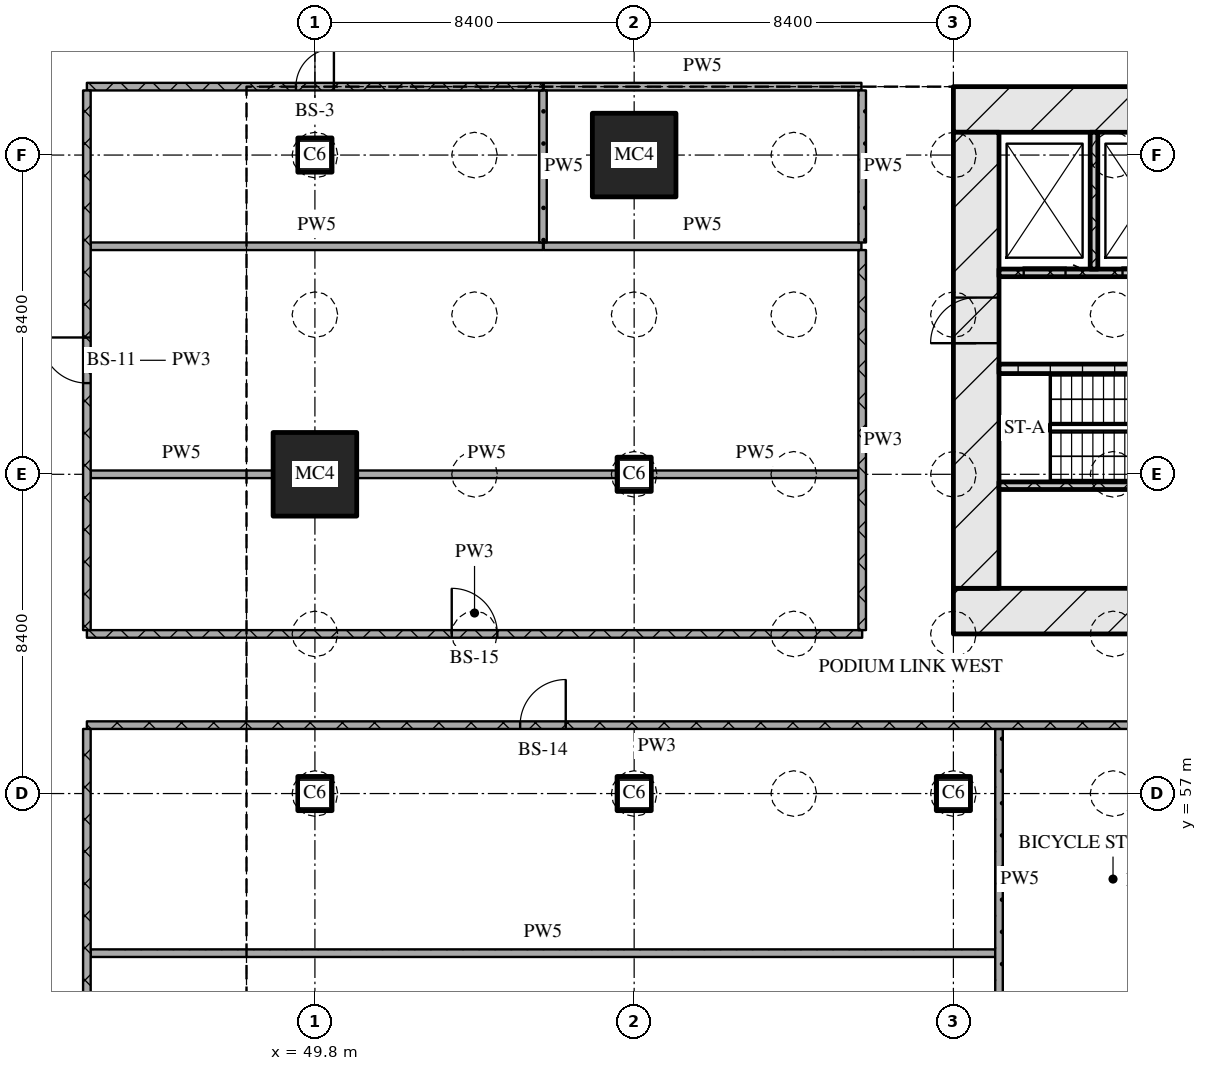
"""IFC4 building model, lengths in metres.
Left out: names, types, materials, properties, quantities, classifications, styles, units other than length and angle.
Written with IfcOpenShell. Run it as: python <this file> out.ifc"""

import sys

from ifc_helpers import new_model, si_unit, direction, frame, frame_2d, origin, origin_2d, place, context, subcontext, project, spatial, rectangle, extrude, element, fill, save


model = new_model("IFC4")
c1 = context("Model", 3, precision=1e-05, world=origin(), true_north=direction((0.0, 1.0)))
c2 = subcontext(c1, "Body", "Model", "MODEL_VIEW")
j1 = project(units=[si_unit("LENGTHUNIT", "METRE"), si_unit("PLANEANGLEUNIT", "RADIAN")], contexts=[c1])
p1 = place(None, origin())
s1 = spatial("IfcSite", under=j1, at=p1, CompositionType="ELEMENT")
p2 = place(p1, origin())
s2 = spatial("IfcBuilding", under=s1, at=p2, CompositionType="ELEMENT")
p3 = place(p2, frame((0.0, 0.0, -6.0)))
s3 = spatial("IfcBuildingStorey", under=s2, at=p3, CompositionType="ELEMENT", Elevation=-6.0)
p4 = place(p3, frame((49.8, 57.0, 0.0), z_axis=(0.0, 0.0, 1.0), x_axis=(1.0, 0.0, 0.0)))
e1 = element("IfcColumn", 1, at=p4, inside=s3, PredefinedType="COLUMN", context=c2, shape_type="SweptSolid", body=[
    extrude(rectangle(XDim=0.9, YDim=0.9, at=origin_2d()), origin(), (0.0, 0.0, 1.0), 6.0),
])
p5 = place(p3, frame((49.8, 65.4, 0.0), z_axis=(0.0, 0.0, 1.0), x_axis=(1.0, 0.0, 0.0)))
e2 = element("IfcColumn", 2, at=p5, inside=s3, PredefinedType="COLUMN", context=c2, shape_type="SweptSolid", body=[
    extrude(rectangle(XDim=2.2, YDim=2.2, at=origin_2d()), origin(), (0.0, 0.0, 1.0), 6.0),
])
for number, where, z_axis, x_axis in (
    (3, (49.8, 73.8, 0.0), (0.0, 0.0, 1.0), (1.0, 0.0, 0.0)),
    (4, (58.2, 57.0, 0.0), (0.0, 0.0, 1.0), (1.0, 0.0, 0.0)),
    (5, (58.2, 65.4, 0.0), (0.0, 0.0, 1.0), (1.0, 0.0, 0.0)),
):
    element("IfcColumn", number, at=place(p3, frame(where, z_axis=z_axis, x_axis=x_axis)), inside=s3, PredefinedType="COLUMN", context=c2, shape_type="SweptSolid", body=[
        extrude(rectangle(XDim=0.9, YDim=0.9, at=origin_2d()), origin(), (0.0, 0.0, 1.0), 6.0),
    ])
p6 = place(p3, frame((58.2, 73.8, 0.0), z_axis=(0.0, 0.0, 1.0), x_axis=(1.0, 0.0, 0.0)))
e6 = element("IfcColumn", 6, at=p6, inside=s3, PredefinedType="COLUMN", context=c2, shape_type="SweptSolid", body=[
    extrude(rectangle(XDim=2.2, YDim=2.2, at=origin_2d()), origin(), (0.0, 0.0, 1.0), 6.0),
])
p7 = place(p3, frame((66.6, 57.0, 0.0), z_axis=(0.0, 0.0, 1.0), x_axis=(1.0, 0.0, 0.0)))
e7 = element("IfcColumn", 7, at=p7, inside=s3, PredefinedType="COLUMN", context=c2, shape_type="SweptSolid", body=[
    extrude(rectangle(XDim=0.9, YDim=0.9, at=origin_2d()), origin(), (0.0, 0.0, 1.0), 6.0),
])
p8 = place(p3, frame((66.6, 61.8, 0.0), z_axis=(0.0, 0.0, 1.0), x_axis=(1.0, 0.0, 0.0)))
e8 = element("IfcWall", 8, at=p8, inside=s3, PredefinedType="SOLIDWALL", context=c2, shape_type="SweptSolid", body=[
    extrude(rectangle(XDim=42.0, YDim=1.2, at=frame_2d((21.0, 0.0))), origin(), (0.0, 0.0, 1.0), 5.7),
])
p9 = place(p8, frame((21.35, 0.0, 0.0)))
e9 = element("IfcOpeningElement", 9, at=p9, cuts=e8, PredefinedType="OPENING", context=c2, shape_type="SweptSolid", body=[
    extrude(rectangle(XDim=1.8, YDim=2.1, at=frame_2d((0.9, 1.05))), frame((0.0, 0.61, 0.0), z_axis=(0.0, -1.0, 0.0), x_axis=(1.0, 0.0, 0.0)), (0.0, 0.0, 1.0), 1.22),
])
p10 = place(p3, frame((66.6, 75.0, 0.0), z_axis=(0.0, 0.0, 1.0), x_axis=(1.0, 0.0, 0.0)))
e10 = element("IfcWall", 10, at=p10, inside=s3, PredefinedType="SOLIDWALL", context=c2, shape_type="SweptSolid", body=[
    extrude(rectangle(XDim=42.0, YDim=1.2, at=frame_2d((21.0, 0.0))), origin(), (0.0, 0.0, 1.0), 5.7),
])
p11 = place(p3, frame((67.2, 62.4, 0.0), z_axis=(0.0, 0.0, 1.0), x_axis=(0.0, 1.0, 0.0)))
e11 = element("IfcWall", 11, at=p11, inside=s3, PredefinedType="SOLIDWALL", context=c2, shape_type="SweptSolid", body=[
    extrude(rectangle(XDim=12.0, YDim=1.2, at=frame_2d((6.0, 0.0))), origin(), (0.0, 0.0, 1.0), 5.7),
])
p12 = place(p11, frame((6.45, 0.0, 0.0)))
e12 = element("IfcOpeningElement", 12, at=p12, cuts=e11, PredefinedType="OPENING", context=c2, shape_type="SweptSolid", body=[
    extrude(rectangle(XDim=1.2, YDim=2.1, at=frame_2d((0.6, 1.05))), frame((0.0, 0.61, 0.0), z_axis=(0.0, -1.0, 0.0), x_axis=(1.0, 0.0, 0.0)), (0.0, 0.0, 1.0), 1.22),
])
p13 = place(p3, frame((67.8, 65.1, 0.0), z_axis=(0.0, 0.0, 1.0), x_axis=(1.0, 0.0, 0.0)))
e13 = element("IfcWall", 13, at=p13, inside=s3, PredefinedType="SOLIDWALL", context=c2, shape_type="SweptSolid", body=[
    extrude(rectangle(XDim=18.5, YDim=0.2, at=frame_2d((9.25, 0.0))), origin(), (0.0, 0.0, 1.0), 5.7),
])
p14 = place(p13, frame((7.27, 0.0, 0.0)))
e14 = element("IfcOpeningElement", 14, at=p14, cuts=e13, PredefinedType="OPENING", context=c2, shape_type="SweptSolid", body=[
    extrude(rectangle(XDim=0.9, YDim=2.1, at=frame_2d((0.45, 1.05))), frame((0.0, 0.11, 0.0), z_axis=(0.0, -1.0, 0.0), x_axis=(1.0, 0.0, 0.0)), (0.0, 0.0, 1.0), 0.22),
])
p15 = place(p3, frame((67.8, 68.175, 0.0), z_axis=(0.0, 0.0, 1.0), x_axis=(1.0, 0.0, 0.0)))
e15 = element("IfcWall", 15, at=p15, inside=s3, PredefinedType="SOLIDWALL", context=c2, shape_type="SweptSolid", body=[
    extrude(rectangle(XDim=8.25, YDim=0.25, at=frame_2d((4.125, 0.0))), origin(), (0.0, 0.0, 1.0), 5.7),
])
p16 = place(p15, frame((5.7, 0.0, 0.0)))
e16 = element("IfcOpeningElement", 16, at=p16, cuts=e15, PredefinedType="OPENING", context=c2, shape_type="SweptSolid", body=[
    extrude(rectangle(XDim=1.0, YDim=2.1, at=frame_2d((0.5, 1.05))), frame((0.0, 0.135, 0.0), z_axis=(0.0, -1.0, 0.0), x_axis=(1.0, 0.0, 0.0)), (0.0, 0.0, 1.0), 0.27),
])
p17 = place(p15, frame((7.2, 0.0, 0.0)))
e17 = element("IfcOpeningElement", 17, at=p17, cuts=e15, PredefinedType="OPENING", context=c2, shape_type="SweptSolid", body=[
    extrude(rectangle(XDim=0.8, YDim=2.1, at=frame_2d((0.4, 1.05))), frame((0.0, 0.135, 0.0), z_axis=(0.0, -1.0, 0.0), x_axis=(1.0, 0.0, 0.0)), (0.0, 0.0, 1.0), 0.27),
])
p18 = place(p3, frame((67.8, 70.7, 0.0), z_axis=(0.0, 0.0, 1.0), x_axis=(1.0, 0.0, 0.0)))
e18 = element("IfcWall", 18, at=p18, inside=s3, PredefinedType="SOLIDWALL", context=c2, shape_type="SweptSolid", body=[
    extrude(rectangle(XDim=39.6, YDim=0.2, at=frame_2d((19.8, 0.0))), origin(), (0.0, 0.0, 1.0), 5.7),
])
p19 = place(p18, frame((0.65, 0.0, 0.0)))
e19 = element("IfcOpeningElement", 19, at=p19, cuts=e18, PredefinedType="OPENING", context=c2, shape_type="SweptSolid", body=[
    extrude(rectangle(XDim=1.1, YDim=2.1, at=frame_2d((0.55, 1.05))), frame((0.0, 0.11, 0.0), z_axis=(0.0, -1.0, 0.0), x_axis=(1.0, 0.0, 0.0)), (0.0, 0.0, 1.0), 0.22),
])
p20 = place(p18, frame((3.25, 0.0, 0.0)))
e20 = element("IfcOpeningElement", 20, at=p20, cuts=e18, PredefinedType="OPENING", context=c2, shape_type="SweptSolid", body=[
    extrude(rectangle(XDim=1.1, YDim=2.1, at=frame_2d((0.55, 1.05))), frame((0.0, 0.11, 0.0), z_axis=(0.0, -1.0, 0.0), x_axis=(1.0, 0.0, 0.0)), (0.0, 0.0, 1.0), 0.22),
])
p21 = place(p18, frame((5.9, 0.0, 0.0)))
e21 = element("IfcOpeningElement", 21, at=p21, cuts=e18, PredefinedType="OPENING", context=c2, shape_type="SweptSolid", body=[
    extrude(rectangle(XDim=1.0, YDim=2.1, at=frame_2d((0.5, 1.05))), frame((0.0, 0.11, 0.0), z_axis=(0.0, -1.0, 0.0), x_axis=(1.0, 0.0, 0.0)), (0.0, 0.0, 1.0), 0.22),
])
p22 = place(p18, frame((21.7, 0.0, 0.0)))
e22 = element("IfcOpeningElement", 22, at=p22, cuts=e18, PredefinedType="OPENING", context=c2, shape_type="SweptSolid", body=[
    extrude(rectangle(XDim=1.0, YDim=2.1, at=frame_2d((0.5, 1.05))), frame((0.0, 0.11, 0.0), z_axis=(0.0, -1.0, 0.0), x_axis=(1.0, 0.0, 0.0)), (0.0, 0.0, 1.0), 0.22),
])
p23 = place(p18, frame((32.7, 0.0, 0.0)))
e23 = element("IfcOpeningElement", 23, at=p23, cuts=e18, PredefinedType="OPENING", context=c2, shape_type="SweptSolid", body=[
    extrude(rectangle(XDim=1.0, YDim=2.1, at=frame_2d((0.5, 1.05))), frame((0.0, 0.11, 0.0), z_axis=(0.0, -1.0, 0.0), x_axis=(1.0, 0.0, 0.0)), (0.0, 0.0, 1.0), 0.22),
])
p24 = place(p18, frame((35.25, 0.0, 0.0)))
e24 = element("IfcOpeningElement", 24, at=p24, cuts=e18, PredefinedType="OPENING", context=c2, shape_type="SweptSolid", body=[
    extrude(rectangle(XDim=1.1, YDim=2.1, at=frame_2d((0.55, 1.05))), frame((0.0, 0.11, 0.0), z_axis=(0.0, -1.0, 0.0), x_axis=(1.0, 0.0, 0.0)), (0.0, 0.0, 1.0), 0.22),
])
p25 = place(p18, frame((37.85, 0.0, 0.0)))
e25 = element("IfcOpeningElement", 25, at=p25, cuts=e18, PredefinedType="OPENING", context=c2, shape_type="SweptSolid", body=[
    extrude(rectangle(XDim=1.1, YDim=2.1, at=frame_2d((0.55, 1.05))), frame((0.0, 0.11, 0.0), z_axis=(0.0, -1.0, 0.0), x_axis=(1.0, 0.0, 0.0)), (0.0, 0.0, 1.0), 0.22),
])
p26 = place(p3, frame((70.3, 70.8, 0.0), z_axis=(0.0, 0.0, 1.0), x_axis=(0.0, 1.0, 0.0)))
e26 = element("IfcWall", 26, at=p26, inside=s3, PredefinedType="SOLIDWALL", context=c2, shape_type="SweptSolid", body=[
    extrude(rectangle(XDim=3.6, YDim=0.2, at=frame_2d((1.8, 0.0))), origin(), (0.0, 0.0, 1.0), 5.7),
])
p27 = place(p3, frame((43.9, 52.8, 0.0), z_axis=(0.0, 0.0, 1.0), x_axis=(1.0, 0.0, 0.0)))
e27 = element("IfcWall", 27, at=p27, inside=s3, PredefinedType="PARTITIONING", context=c2, shape_type="SweptSolid", body=[
    extrude(rectangle(XDim=23.8, YDim=0.2, at=frame_2d((11.9, 0.0))), origin(), (0.0, 0.0, 1.0), 5.7),
])
p28 = place(p3, frame((73.8, 58.8, 0.0), z_axis=(0.0, 0.0, 1.0), x_axis=(-1.0, 0.0, 0.0)))
e28 = element("IfcWall", 28, at=p28, inside=s3, PredefinedType="PARTITIONING", context=c2, shape_type="SweptSolid", body=[
    extrude(rectangle(XDim=30.0, YDim=0.2, at=frame_2d((15.0, 0.0))), origin(), (0.0, 0.0, 1.0), 5.7),
])
p29 = place(p28, frame((17.4, 0.0, 0.0)))
e29 = element("IfcOpeningElement", 29, at=p29, cuts=e28, PredefinedType="OPENING", context=c2, shape_type="SweptSolid", body=[
    extrude(rectangle(XDim=1.2, YDim=2.1, at=frame_2d((0.6, 1.05))), frame((0.0, 0.11, 0.0), z_axis=(0.0, -1.0, 0.0), x_axis=(1.0, 0.0, 0.0)), (0.0, 0.0, 1.0), 0.22),
])
p30 = place(p3, frame((43.8, 61.2, 0.0), z_axis=(0.0, 0.0, 1.0), x_axis=(1.0, 0.0, 0.0)))
e30 = element("IfcWall", 30, at=p30, inside=s3, PredefinedType="PARTITIONING", context=c2, shape_type="SweptSolid", body=[
    extrude(rectangle(XDim=20.4, YDim=0.2, at=frame_2d((10.2, 0.0))), origin(), (0.0, 0.0, 1.0), 5.7),
])
p31 = place(p30, frame((9.6, 0.0, 0.0)))
e31 = element("IfcOpeningElement", 31, at=p31, cuts=e30, PredefinedType="OPENING", context=c2, shape_type="SweptSolid", body=[
    extrude(rectangle(XDim=1.2, YDim=2.1, at=frame_2d((0.6, 1.05))), frame((0.0, 0.11, 0.0), z_axis=(0.0, -1.0, 0.0), x_axis=(1.0, 0.0, 0.0)), (0.0, 0.0, 1.0), 0.22),
])
p32 = place(p3, frame((43.9, 65.4, 0.0), z_axis=(0.0, 0.0, 1.0), x_axis=(1.0, 0.0, 0.0)))
e32 = element("IfcWall", 32, at=p32, inside=s3, PredefinedType="PARTITIONING", context=c2, shape_type="SweptSolid", body=[
    extrude(rectangle(XDim=4.78, YDim=0.2, at=frame_2d((2.39, 0.0))), origin(), (0.0, 0.0, 1.0), 4.71),
])
p33 = place(p3, frame((50.92, 65.4, 0.0), z_axis=(0.0, 0.0, 1.0), x_axis=(1.0, 0.0, 0.0)))
e33 = element("IfcWall", 33, at=p33, inside=s3, PredefinedType="PARTITIONING", context=c2, shape_type="SweptSolid", body=[
    extrude(rectangle(XDim=6.81, YDim=0.2, at=frame_2d((3.405, 0.0))), origin(), (0.0, 0.0, 1.0), 5.7),
])
p34 = place(p3, frame((58.67, 65.4, 0.0), z_axis=(0.0, 0.0, 1.0), x_axis=(1.0, 0.0, 0.0)))
e34 = element("IfcWall", 34, at=p34, inside=s3, PredefinedType="PARTITIONING", context=c2, shape_type="SweptSolid", body=[
    extrude(rectangle(XDim=5.43, YDim=0.2, at=frame_2d((2.715, 0.0))), origin(), (0.0, 0.0, 1.0), 5.1),
])
p35 = place(p3, frame((55.82, 71.4, 0.0), z_axis=(0.0, 0.0, 1.0), x_axis=(1.0, 0.0, 0.0)))
e35 = element("IfcWall", 35, at=p35, inside=s3, PredefinedType="PARTITIONING", context=c2, shape_type="SweptSolid", body=[
    extrude(rectangle(XDim=8.36, YDim=0.2, at=frame_2d((4.18, 0.0))), origin(), (0.0, 0.0, 1.0), 5.7),
])
p36 = place(p3, frame((43.9, 71.4, 0.0), z_axis=(0.0, 0.0, 1.0), x_axis=(1.0, 0.0, 0.0)))
e36 = element("IfcWall", 36, at=p36, inside=s3, PredefinedType="PARTITIONING", context=c2, shape_type="SweptSolid", body=[
    extrude(rectangle(XDim=11.9, YDim=0.2, at=frame_2d((5.95, 0.0))), origin(), (0.0, 0.0, 1.0), 5.7),
])
p37 = place(p3, frame((55.8, 75.6, 0.0), z_axis=(0.0, 0.0, 1.0), x_axis=(-1.0, 0.0, 0.0)))
e37 = element("IfcWall", 37, at=p37, inside=s3, PredefinedType="PARTITIONING", context=c2, shape_type="SweptSolid", body=[
    extrude(rectangle(XDim=12.0, YDim=0.2, at=frame_2d((6.0, 0.0))), origin(), (0.0, 0.0, 1.0), 5.7),
])
p38 = place(p37, frame((5.5, 0.0, 0.0)))
e38 = element("IfcOpeningElement", 38, at=p38, cuts=e37, PredefinedType="OPENING", context=c2, shape_type="SweptSolid", body=[
    extrude(rectangle(XDim=1.0, YDim=2.1, at=frame_2d((0.5, 1.05))), frame((0.0, 0.11, 0.0), z_axis=(0.0, -1.0, 0.0), x_axis=(1.0, 0.0, 0.0)), (0.0, 0.0, 1.0), 0.22),
])
p39 = place(p3, frame((55.82, 75.6, 0.0), z_axis=(0.0, 0.0, 1.0), x_axis=(1.0, 0.0, 0.0)))
e39 = element("IfcWall", 39, at=p39, inside=s3, PredefinedType="PARTITIONING", context=c2, shape_type="SweptSolid", body=[
    extrude(rectangle(XDim=8.36, YDim=0.2, at=frame_2d((4.18, 0.0))), origin(), (0.0, 0.0, 1.0), 5.7),
])
p40 = place(p3, frame((43.8, 58.7, 0.0), z_axis=(0.0, 0.0, 1.0), x_axis=(0.0, -1.0, 0.0)))
e40 = element("IfcWall", 40, at=p40, inside=s3, PredefinedType="PARTITIONING", context=c2, shape_type="SweptSolid", body=[
    extrude(rectangle(XDim=24.4, YDim=0.2, at=frame_2d((12.2, 0.0))), origin(), (0.0, 0.0, 1.0), 5.2),
])
p41 = place(p40, frame((14.55, 0.0, 0.0)))
e41 = element("IfcOpeningElement", 41, at=p41, cuts=e40, PredefinedType="OPENING", context=c2, shape_type="SweptSolid", body=[
    extrude(rectangle(XDim=1.2, YDim=2.1, at=frame_2d((0.6, 1.05))), frame((0.0, 0.11, 0.0), z_axis=(0.0, -1.0, 0.0), x_axis=(1.0, 0.0, 0.0)), (0.0, 0.0, 1.0), 0.22),
])
p42 = place(p3, frame((43.8, 75.5, 0.0), z_axis=(0.0, 0.0, 1.0), x_axis=(0.0, -1.0, 0.0)))
e42 = element("IfcWall", 42, at=p42, inside=s3, PredefinedType="PARTITIONING", context=c2, shape_type="SweptSolid", body=[
    extrude(rectangle(XDim=14.2, YDim=0.2, at=frame_2d((7.1, 0.0))), origin(), (0.0, 0.0, 1.0), 4.8),
])
p43 = place(p42, frame((6.5, 0.0, 0.0)))
e43 = element("IfcOpeningElement", 43, at=p43, cuts=e42, PredefinedType="OPENING", context=c2, shape_type="SweptSolid", body=[
    extrude(rectangle(XDim=1.2, YDim=2.1, at=frame_2d((0.6, 1.05))), frame((0.0, 0.11, 0.0), z_axis=(0.0, -1.0, 0.0), x_axis=(1.0, 0.0, 0.0)), (0.0, 0.0, 1.0), 0.22),
])
p44 = place(p3, frame((55.8, 75.5, 0.0), z_axis=(0.0, 0.0, 1.0), x_axis=(0.0, -1.0, 0.0)))
e44 = element("IfcWall", 44, at=p44, inside=s3, PredefinedType="PARTITIONING", context=c2, shape_type="SweptSolid", body=[
    extrude(rectangle(XDim=4.0, YDim=0.2, at=frame_2d((2.0, 0.0))), origin(), (0.0, 0.0, 1.0), 5.7),
])
p45 = place(p3, frame((64.2, 71.3, 0.0), z_axis=(0.0, 0.0, 1.0), x_axis=(0.0, -1.0, 0.0)))
e45 = element("IfcWall", 45, at=p45, inside=s3, PredefinedType="PARTITIONING", context=c2, shape_type="SweptSolid", body=[
    extrude(rectangle(XDim=10.0, YDim=0.2, at=frame_2d((5.0, 0.0))), origin(), (0.0, 0.0, 1.0), 5.7),
])
p46 = place(p3, frame((64.2, 75.5, 0.0), z_axis=(0.0, 0.0, 1.0), x_axis=(0.0, -1.0, 0.0)))
e46 = element("IfcWall", 46, at=p46, inside=s3, PredefinedType="PARTITIONING", context=c2, shape_type="SweptSolid", body=[
    extrude(rectangle(XDim=4.0, YDim=0.2, at=frame_2d((2.0, 0.0))), origin(), (0.0, 0.0, 1.0), 5.7),
])
p47 = place(p3, frame((67.8, 58.7, 0.0), z_axis=(0.0, 0.0, 1.0), x_axis=(0.0, -1.0, 0.0)))
e47 = element("IfcWall", 47, at=p47, inside=s3, PredefinedType="PARTITIONING", context=c2, shape_type="SweptSolid", body=[
    extrude(rectangle(XDim=7.9, YDim=0.2, at=frame_2d((3.95, 0.0))), origin(), (0.0, 0.0, 1.0), 5.7),
])
p48 = place(p12, origin())
e48 = element("IfcDoor", 48, at=p48, inside=s3, OperationType="SINGLE_SWING_LEFT", PredefinedType="DOOR", context=c2, shape_type="SweptSolid", body=[
    extrude(rectangle(XDim=1.2, YDim=2.1, at=frame_2d((0.6, 1.05))), frame((0.0, 0.025, 0.0), z_axis=(0.0, -1.0, 0.0), x_axis=(1.0, 0.0, 0.0)), (0.0, 0.0, 1.0), 0.05),
])
fill(e12, e48)
p49 = place(p19, origin())
e49 = element("IfcDoor", 49, at=p49, inside=s3, OperationType="SLIDING_TO_RIGHT", PredefinedType="DOOR", context=c2, shape_type="SweptSolid", body=[
    extrude(rectangle(XDim=1.1, YDim=2.1, at=frame_2d((0.55, 1.05))), frame((0.0, 0.025, 0.0), z_axis=(0.0, -1.0, 0.0), x_axis=(1.0, 0.0, 0.0)), (0.0, 0.0, 1.0), 0.05),
])
fill(e19, e49)
p50 = place(p20, origin())
e50 = element("IfcDoor", 50, at=p50, inside=s3, OperationType="SLIDING_TO_RIGHT", PredefinedType="DOOR", context=c2, shape_type="SweptSolid", body=[
    extrude(rectangle(XDim=1.1, YDim=2.1, at=frame_2d((0.55, 1.05))), frame((0.0, 0.025, 0.0), z_axis=(0.0, -1.0, 0.0), x_axis=(1.0, 0.0, 0.0)), (0.0, 0.0, 1.0), 0.05),
])
fill(e20, e50)
p51 = place(p29, origin())
e51 = element("IfcDoor", 51, at=p51, inside=s3, OperationType="SINGLE_SWING_RIGHT", PredefinedType="DOOR", context=c2, shape_type="SweptSolid", body=[
    extrude(rectangle(XDim=1.2, YDim=2.1, at=frame_2d((0.6, 1.05))), frame((0.0, 0.025, 0.0), z_axis=(0.0, -1.0, 0.0), x_axis=(1.0, 0.0, 0.0)), (0.0, 0.0, 1.0), 0.05),
])
fill(e29, e51)
p52 = place(p31, origin())
e52 = element("IfcDoor", 52, at=p52, inside=s3, OperationType="SINGLE_SWING_LEFT", PredefinedType="DOOR", context=c2, shape_type="SweptSolid", body=[
    extrude(rectangle(XDim=1.2, YDim=2.1, at=frame_2d((0.6, 1.05))), frame((0.0, 0.025, 0.0), z_axis=(0.0, -1.0, 0.0), x_axis=(1.0, 0.0, 0.0)), (0.0, 0.0, 1.0), 0.05),
])
fill(e31, e52)
p53 = place(p38, origin())
e53 = element("IfcDoor", 53, at=p53, inside=s3, OperationType="SINGLE_SWING_RIGHT", PredefinedType="DOOR", context=c2, shape_type="SweptSolid", body=[
    extrude(rectangle(XDim=1.0, YDim=2.1, at=frame_2d((0.5, 1.05))), frame((0.0, 0.025, 0.0), z_axis=(0.0, -1.0, 0.0), x_axis=(1.0, 0.0, 0.0)), (0.0, 0.0, 1.0), 0.05),
])
fill(e38, e53)
p54 = place(p43, origin())
e54 = element("IfcDoor", 54, at=p54, inside=s3, OperationType="SINGLE_SWING_RIGHT", PredefinedType="DOOR", context=c2, shape_type="SweptSolid", body=[
    extrude(rectangle(XDim=1.2, YDim=2.1, at=frame_2d((0.6, 1.05))), frame((0.0, 0.025, 0.0), z_axis=(0.0, -1.0, 0.0), x_axis=(1.0, 0.0, 0.0)), (0.0, 0.0, 1.0), 0.05),
])
fill(e43, e54)
save(model, sys.argv[1])
